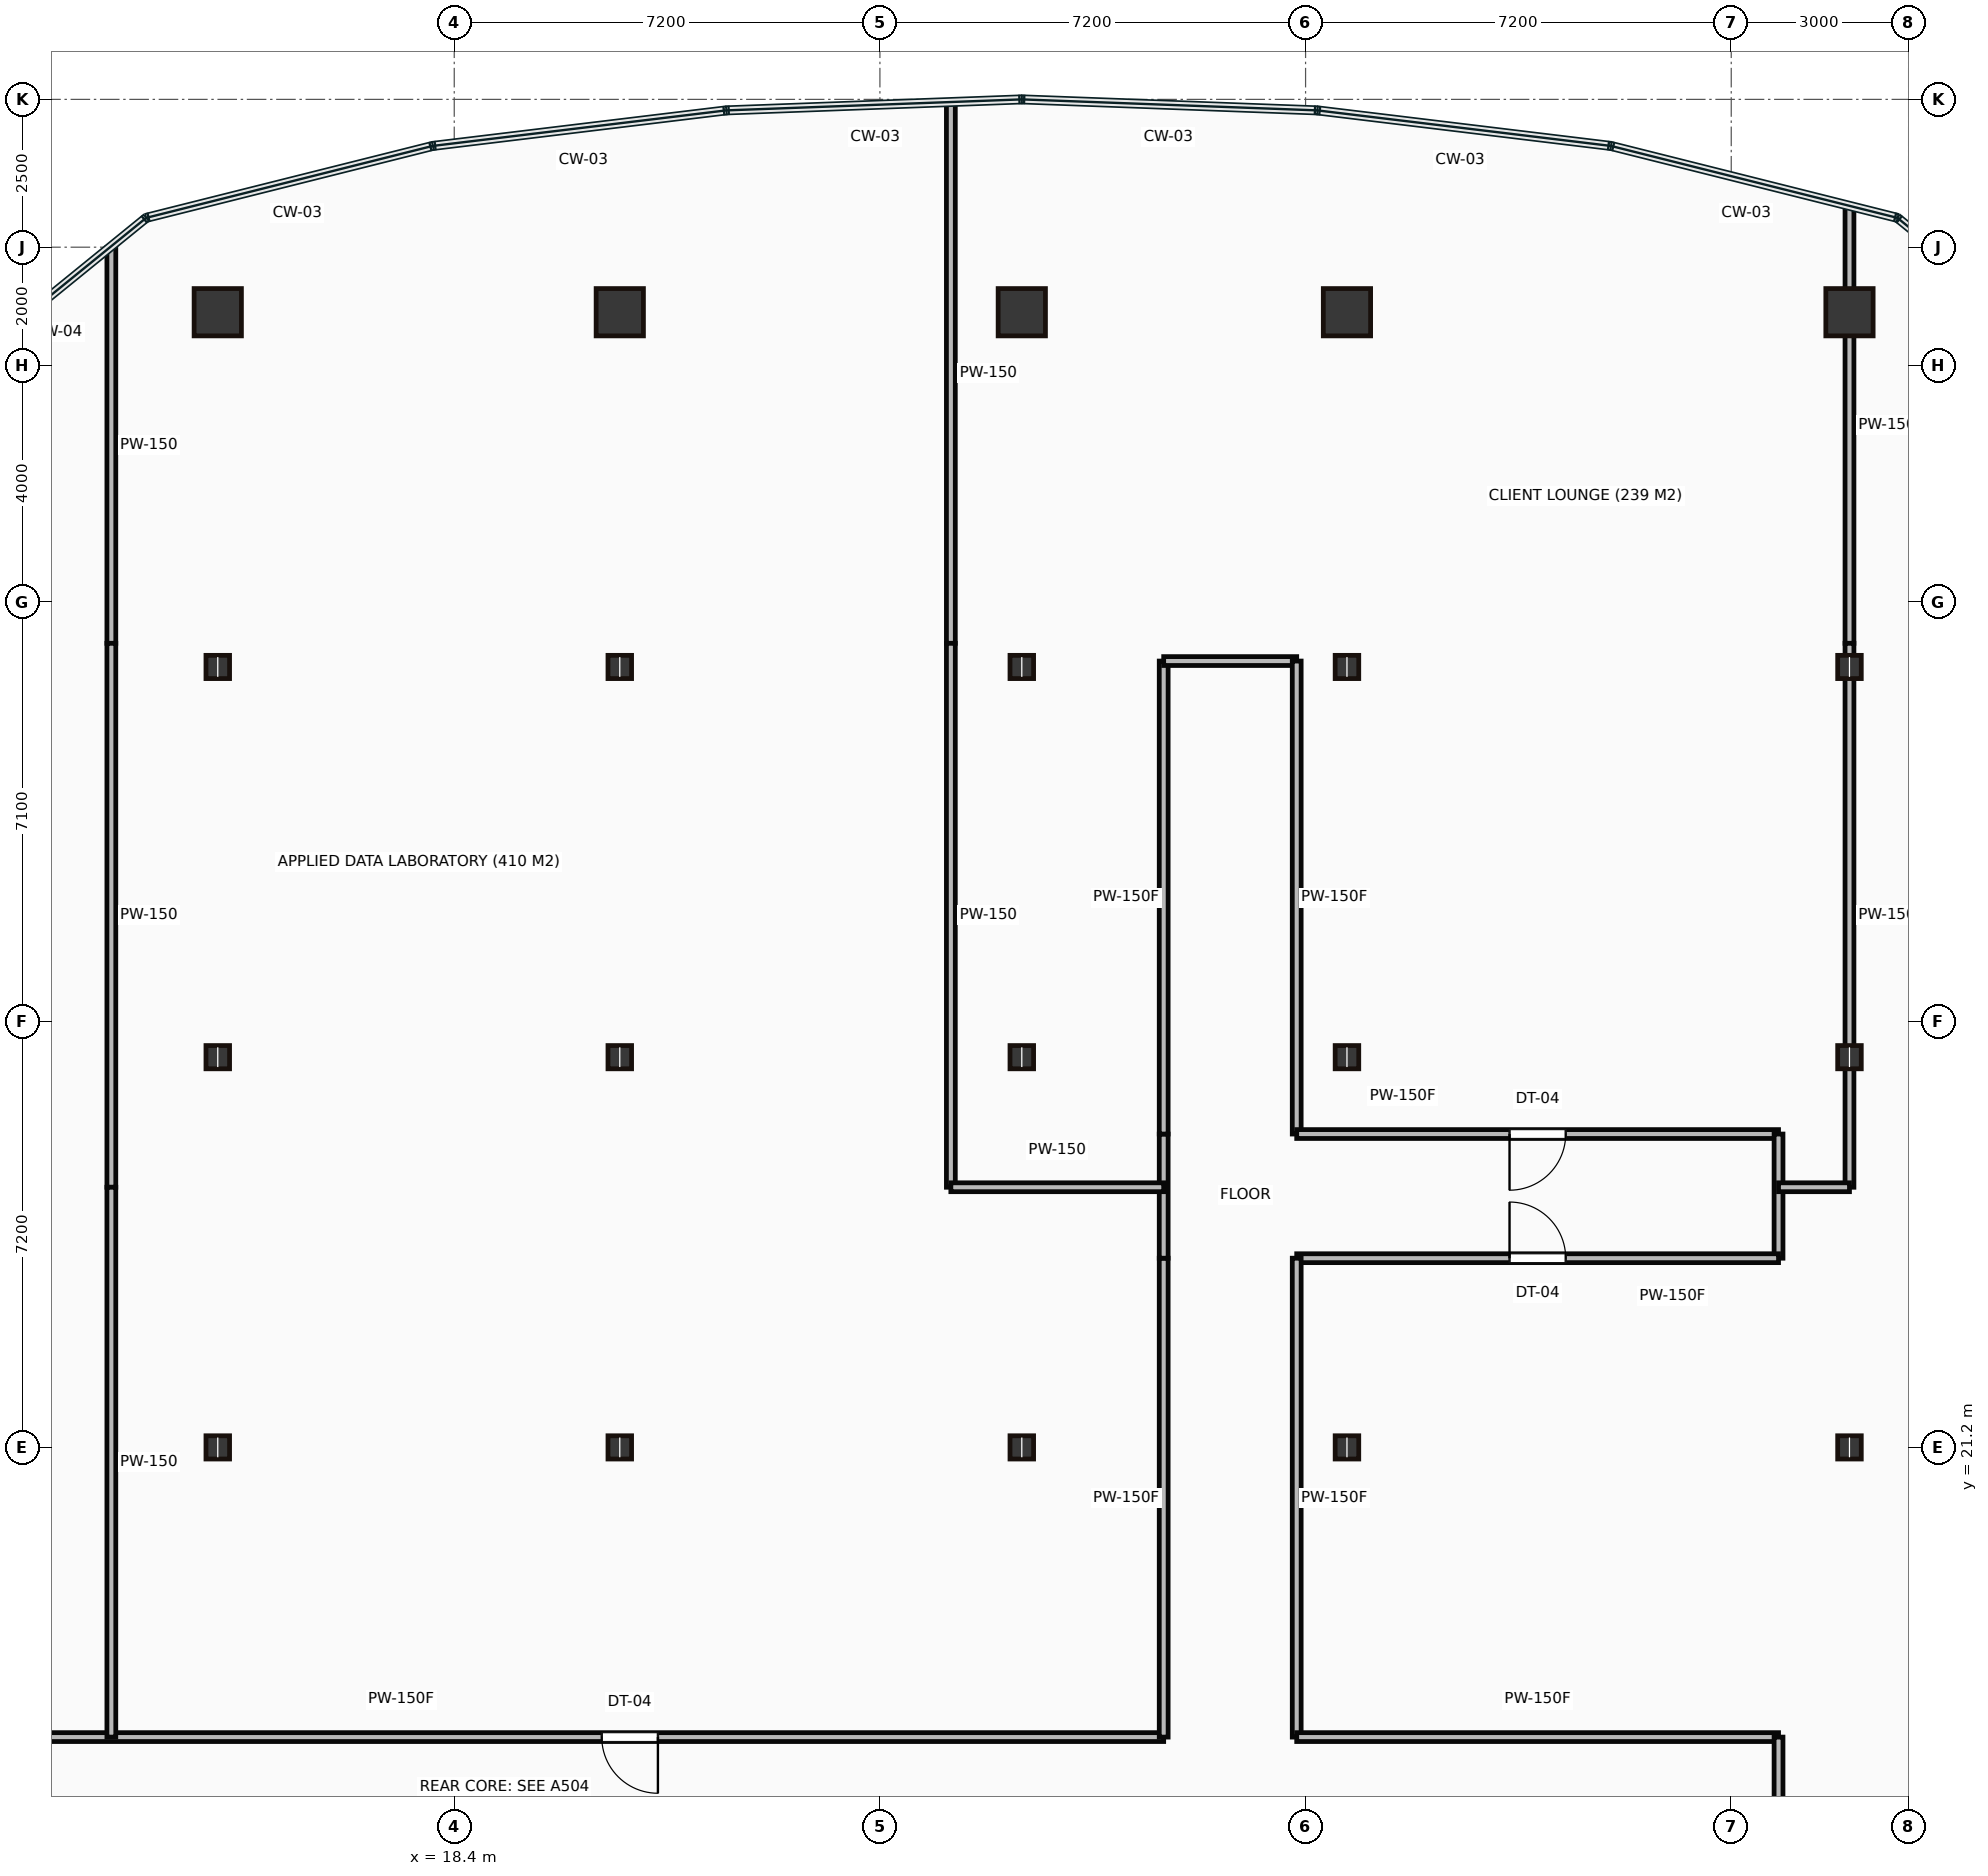
"""IFC4 building model, lengths in metres.
Left out: names, types, materials, properties, quantities, classifications, styles, units other than length and angle.
Written with IfcOpenShell. Run it as: python <this file> out.ifc"""

import sys

from ifc_helpers import new_model, si_unit, direction, frame, frame_2d, origin, origin_2d, place, context, subcontext, project, spatial, rectangle, hollow_rectangle, i_section, extrude, source, transform, mapped, element, fill, save


model = new_model("IFC4")
c1 = context("Model", 3, precision=1e-05, world=origin(), true_north=direction((0.0, 1.0)))
c2 = subcontext(c1, "Body", "Model", "MODEL_VIEW")
j1 = project(units=[si_unit("LENGTHUNIT", "METRE"), si_unit("PLANEANGLEUNIT", "RADIAN")], contexts=[c1])
p1 = place(None, origin())
s1 = spatial("IfcSite", under=j1, at=p1, CompositionType="ELEMENT")
p2 = place(p1, origin())
s2 = spatial("IfcBuilding", under=s1, at=p2, CompositionType="ELEMENT")
p3 = place(p2, frame((0.0, 0.0, 99.6)))
s3 = spatial("IfcBuildingStorey", under=s2, at=p3, CompositionType="ELEMENT", Elevation=99.6)
m1 = source(origin(), c2, "Body", "SweptSolid", [
    extrude(i_section(OverallWidth=0.399, OverallDepth=0.393, WebThickness=0.023, FlangeThickness=0.037, at=origin_2d()), origin(), (0.0, 0.0, 1.0), 3.65),
])
for number, where, z_axis, x_axis in (
    (1, (14.4, 21.2, 0.0), (0.0, 0.0, 1.0), (1.0, 0.0, 0.0)),
    (2, (14.4, 27.8, 0.0), (0.0, 0.0, 1.0), (1.0, 0.0, 0.0)),
    (3, (14.4, 34.4, 0.0), (0.0, 0.0, 1.0), (1.0, 0.0, 0.0)),
):
    element("IfcColumn", number, at=place(p3, frame(where, z_axis=z_axis, x_axis=x_axis)), inside=s3, PredefinedType="COLUMN", context=c2, shape_type="MappedRepresentation", body=[
        mapped(m1, transform((0.0, 0.0, 0.0))),
    ])
m2 = source(origin(), c2, "Body", "SweptSolid", [
    extrude(hollow_rectangle(XDim=0.8, YDim=0.8, WallThickness=0.04, at=origin_2d()), origin(), (0.0, 0.0, 1.0), 3.65),
])
p4 = place(p3, frame((14.4, 40.4, 0.0), z_axis=(0.0, 0.0, 1.0), x_axis=(1.0, 0.0, 0.0)))
e4 = element("IfcColumn", 4, at=p4, inside=s3, PredefinedType="COLUMN", context=c2, shape_type="MappedRepresentation", body=[
    mapped(m2, transform((0.0, 0.0, 0.0))),
])
for number, where, z_axis, x_axis in (
    (5, (21.2, 21.2, 0.0), (0.0, 0.0, 1.0), (1.0, 0.0, 0.0)),
    (6, (21.2, 27.8, 0.0), (0.0, 0.0, 1.0), (1.0, 0.0, 0.0)),
    (7, (21.2, 34.4, 0.0), (0.0, 0.0, 1.0), (1.0, 0.0, 0.0)),
):
    element("IfcColumn", number, at=place(p3, frame(where, z_axis=z_axis, x_axis=x_axis)), inside=s3, PredefinedType="COLUMN", context=c2, shape_type="MappedRepresentation", body=[
        mapped(m1, transform((0.0, 0.0, 0.0))),
    ])
p5 = place(p3, frame((21.2, 40.4, 0.0), z_axis=(0.0, 0.0, 1.0), x_axis=(1.0, 0.0, 0.0)))
e8 = element("IfcColumn", 8, at=p5, inside=s3, PredefinedType="COLUMN", context=c2, shape_type="MappedRepresentation", body=[
    mapped(m2, transform((0.0, 0.0, 0.0))),
])
for number, where, z_axis, x_axis in (
    (9, (28.0, 21.2, 0.0), (0.0, 0.0, 1.0), (1.0, 0.0, 0.0)),
    (10, (28.0, 27.8, 0.0), (0.0, 0.0, 1.0), (1.0, 0.0, 0.0)),
    (11, (28.0, 34.4, 0.0), (0.0, 0.0, 1.0), (1.0, 0.0, 0.0)),
):
    element("IfcColumn", number, at=place(p3, frame(where, z_axis=z_axis, x_axis=x_axis)), inside=s3, PredefinedType="COLUMN", context=c2, shape_type="MappedRepresentation", body=[
        mapped(m1, transform((0.0, 0.0, 0.0))),
    ])
p6 = place(p3, frame((28.0, 40.4, 0.0), z_axis=(0.0, 0.0, 1.0), x_axis=(1.0, 0.0, 0.0)))
e12 = element("IfcColumn", 12, at=p6, inside=s3, PredefinedType="COLUMN", context=c2, shape_type="MappedRepresentation", body=[
    mapped(m2, transform((0.0, 0.0, 0.0))),
])
for number, where, z_axis, x_axis in (
    (13, (33.5, 21.2, 0.0), (0.0, 0.0, 1.0), (1.0, 0.0, 0.0)),
    (14, (33.5, 27.8, 0.0), (0.0, 0.0, 1.0), (1.0, 0.0, 0.0)),
    (15, (33.5, 34.4, 0.0), (0.0, 0.0, 1.0), (1.0, 0.0, 0.0)),
):
    element("IfcColumn", number, at=place(p3, frame(where, z_axis=z_axis, x_axis=x_axis)), inside=s3, PredefinedType="COLUMN", context=c2, shape_type="MappedRepresentation", body=[
        mapped(m1, transform((0.0, 0.0, 0.0))),
    ])
p7 = place(p3, frame((33.5, 40.4, 0.0), z_axis=(0.0, 0.0, 1.0), x_axis=(1.0, 0.0, 0.0)))
e16 = element("IfcColumn", 16, at=p7, inside=s3, PredefinedType="COLUMN", context=c2, shape_type="MappedRepresentation", body=[
    mapped(m2, transform((0.0, 0.0, 0.0))),
])
for number, where, z_axis, x_axis in (
    (17, (42.0, 21.2, 0.0), (0.0, 0.0, 1.0), (1.0, 0.0, 0.0)),
    (18, (42.0, 27.8, 0.0), (0.0, 0.0, 1.0), (1.0, 0.0, 0.0)),
    (19, (42.0, 34.4, 0.0), (0.0, 0.0, 1.0), (1.0, 0.0, 0.0)),
):
    element("IfcColumn", number, at=place(p3, frame(where, z_axis=z_axis, x_axis=x_axis)), inside=s3, PredefinedType="COLUMN", context=c2, shape_type="MappedRepresentation", body=[
        mapped(m1, transform((0.0, 0.0, 0.0))),
    ])
p8 = place(p3, frame((42.0, 40.4, 0.0), z_axis=(0.0, 0.0, 1.0), x_axis=(1.0, 0.0, 0.0)))
e20 = element("IfcColumn", 20, at=p8, inside=s3, PredefinedType="COLUMN", context=c2, shape_type="MappedRepresentation", body=[
    mapped(m2, transform((0.0, 0.0, 0.0))),
])
m3 = source(origin(), c2, "Body", "SweptSolid", [
    extrude(rectangle(XDim=25.8, YDim=0.15, at=frame_2d((12.9, 0.0))), origin(), (0.0, 0.0, 1.0), 3.4),
])
p9 = place(p3, frame((4.6, 16.3, 0.0), z_axis=(0.0, 0.0, 1.0), x_axis=(1.0, 0.0, 0.0)))
e21 = element("IfcWall", 21, at=p9, inside=s3, PredefinedType="PARTITIONING", context=c2, shape_type="MappedRepresentation", body=[
    mapped(m3, transform((0.0, 0.0, 0.0))),
])
p10 = place(p9, frame((3.655, 0.0, 0.0)))
e22 = element("IfcOpeningElement", 22, at=p10, cuts=e21, PredefinedType="OPENING", context=c2, shape_type="SweptSolid", body=[
    extrude(rectangle(XDim=0.95, YDim=2.15, at=frame_2d((0.475, 1.075))), frame((0.0, 0.085, 0.0), z_axis=(0.0, -1.0, 0.0), x_axis=(1.0, 0.0, 0.0)), (0.0, 0.0, 1.0), 0.17),
])
p11 = place(p9, frame((16.295, 0.0, 0.0)))
e23 = element("IfcOpeningElement", 23, at=p11, cuts=e21, PredefinedType="OPENING", context=c2, shape_type="SweptSolid", body=[
    extrude(rectangle(XDim=0.95, YDim=2.15, at=frame_2d((0.475, 1.075))), frame((0.0, 0.085, 0.0), z_axis=(0.0, -1.0, 0.0), x_axis=(1.0, 0.0, 0.0)), (0.0, 0.0, 1.0), 0.17),
])
m4 = source(origin(), c2, "Body", "SweptSolid", [
    extrude(rectangle(XDim=8.1, YDim=0.15, at=frame_2d((4.05, 0.0))), origin(), (0.0, 0.0, 1.0), 3.4),
])
p12 = place(p3, frame((30.4, 16.3, 0.0), z_axis=(0.0, 0.0, 1.0), x_axis=(0.0, 1.0, 0.0)))
e24 = element("IfcWall", 24, at=p12, inside=s3, PredefinedType="PARTITIONING", context=c2, shape_type="MappedRepresentation", body=[
    mapped(m4, transform((0.0, 0.0, 0.0))),
])
m5 = source(origin(), c2, "Body", "SweptSolid", [
    extrude(rectangle(XDim=2.1, YDim=0.15, at=frame_2d((1.05, 0.0))), origin(), (0.0, 0.0, 1.0), 3.4),
])
p13 = place(p3, frame((30.4, 24.4, 0.0), z_axis=(0.0, 0.0, 1.0), x_axis=(0.0, 1.0, 0.0)))
e25 = element("IfcWall", 25, at=p13, inside=s3, PredefinedType="PARTITIONING", context=c2, shape_type="MappedRepresentation", body=[
    mapped(m5, transform((0.0, 0.0, 0.0))),
])
m6 = source(origin(), c2, "Body", "SweptSolid", [
    extrude(rectangle(XDim=8.0, YDim=0.15, at=frame_2d((4.0, 0.0))), origin(), (0.0, 0.0, 1.0), 3.4),
])
p14 = place(p3, frame((30.4, 26.5, 0.0), z_axis=(0.0, 0.0, 1.0), x_axis=(0.0, 1.0, 0.0)))
e26 = element("IfcWall", 26, at=p14, inside=s3, PredefinedType="PARTITIONING", context=c2, shape_type="MappedRepresentation", body=[
    mapped(m6, transform((0.0, 0.0, 0.0))),
])
m7 = source(origin(), c2, "Body", "SweptSolid", [
    extrude(rectangle(XDim=2.25, YDim=0.15, at=frame_2d((1.125, 0.0))), origin(), (0.0, 0.0, 1.0), 2.702),
])
p15 = place(p3, frame((30.4, 34.5, 0.0), z_axis=(0.0, 0.0, 1.0), x_axis=(1.0, 0.0, 0.0)))
e27 = element("IfcWall", 27, at=p15, inside=s3, PredefinedType="PARTITIONING", context=c2, shape_type="MappedRepresentation", body=[
    mapped(m7, transform((0.0, 0.0, 0.0))),
])
p16 = place(p3, frame((32.65, 34.5, 0.0), z_axis=(0.0, 0.0, 1.0), x_axis=(0.0, -1.0, 0.0)))
e28 = element("IfcWall", 28, at=p16, inside=s3, PredefinedType="PARTITIONING", context=c2, shape_type="MappedRepresentation", body=[
    mapped(m6, transform((0.0, 0.0, 0.0))),
])
m8 = source(origin(), c2, "Body", "SweptSolid", [
    extrude(rectangle(XDim=8.15, YDim=0.15, at=frame_2d((4.075, 0.0))), origin(), (0.0, 0.0, 1.0), 3.4),
])
p17 = place(p3, frame((32.65, 26.5, 0.0), z_axis=(0.0, 0.0, 1.0), x_axis=(1.0, 0.0, 0.0)))
e29 = element("IfcWall", 29, at=p17, inside=s3, PredefinedType="PARTITIONING", context=c2, shape_type="MappedRepresentation", body=[
    mapped(m8, transform((0.0, 0.0, 0.0))),
])
p18 = place(p17, frame((3.6, 0.0, 0.0)))
e30 = element("IfcOpeningElement", 30, at=p18, cuts=e29, PredefinedType="OPENING", context=c2, shape_type="SweptSolid", body=[
    extrude(rectangle(XDim=0.95, YDim=2.15, at=frame_2d((0.475, 1.075))), frame((0.0, 0.085, 0.0), z_axis=(0.0, -1.0, 0.0), x_axis=(1.0, 0.0, 0.0)), (0.0, 0.0, 1.0), 0.17),
])
p19 = place(p3, frame((40.8, 26.5, 0.0), z_axis=(0.0, 0.0, 1.0), x_axis=(0.0, -1.0, 0.0)))
e31 = element("IfcWall", 31, at=p19, inside=s3, PredefinedType="PARTITIONING", context=c2, shape_type="MappedRepresentation", body=[
    mapped(m5, transform((0.0, 0.0, 0.0))),
])
p20 = place(p3, frame((40.8, 24.4, 0.0), z_axis=(0.0, 0.0, 1.0), x_axis=(-1.0, 0.0, 0.0)))
e32 = element("IfcWall", 32, at=p20, inside=s3, PredefinedType="PARTITIONING", context=c2, shape_type="MappedRepresentation", body=[
    mapped(m8, transform((0.0, 0.0, 0.0))),
])
p21 = place(p20, frame((3.6, 0.0, 0.0)))
e33 = element("IfcOpeningElement", 33, at=p21, cuts=e32, PredefinedType="OPENING", context=c2, shape_type="SweptSolid", body=[
    extrude(rectangle(XDim=0.95, YDim=2.15, at=frame_2d((0.475, 1.075))), frame((0.0, 0.085, 0.0), z_axis=(0.0, -1.0, 0.0), x_axis=(1.0, 0.0, 0.0)), (0.0, 0.0, 1.0), 0.17),
])
p22 = place(p3, frame((32.65, 24.4, 0.0), z_axis=(0.0, 0.0, 1.0), x_axis=(0.0, -1.0, 0.0)))
e34 = element("IfcWall", 34, at=p22, inside=s3, PredefinedType="PARTITIONING", context=c2, shape_type="MappedRepresentation", body=[
    mapped(m4, transform((0.0, 0.0, 0.0))),
])
p23 = place(p3, frame((32.65, 16.3, 0.0), z_axis=(0.0, 0.0, 1.0), x_axis=(1.0, 0.0, 0.0)))
e35 = element("IfcWall", 35, at=p23, inside=s3, PredefinedType="PARTITIONING", context=c2, shape_type="MappedRepresentation", body=[
    mapped(m8, transform((0.0, 0.0, 0.0))),
])
m9 = source(origin(), c2, "Body", "SweptSolid", [
    extrude(rectangle(XDim=2.3, YDim=0.15, at=frame_2d((1.15, 0.0))), origin(), (0.0, 0.0, 1.0), 3.4),
])
p24 = place(p3, frame((40.8, 16.3, 0.0), z_axis=(0.0, 0.0, 1.0), x_axis=(0.0, -1.0, 0.0)))
e36 = element("IfcWall", 36, at=p24, inside=s3, PredefinedType="PARTITIONING", context=c2, shape_type="MappedRepresentation", body=[
    mapped(m9, transform((0.0, 0.0, 0.0))),
])
m10 = source(origin(), c2, "Body", "SweptSolid", [
    extrude(rectangle(XDim=6.692, YDim=0.15, at=frame_2d((3.346, 0.0))), origin(), (0.0, 0.0, 1.0), 3.4),
])
p25 = place(p3, frame((12.6, 41.492, 0.0), z_axis=(0.0, 0.0, 1.0), x_axis=(0.0, -1.0, 0.0)))
e37 = element("IfcWall", 37, at=p25, inside=s3, PredefinedType="PARTITIONING", context=c2, shape_type="MappedRepresentation", body=[
    mapped(m10, transform((0.0, 0.0, 0.0))),
])
m11 = source(origin(), c2, "Body", "SweptSolid", [
    extrude(rectangle(XDim=9.2, YDim=0.15, at=frame_2d((4.6, 0.0))), origin(), (0.0, 0.0, 1.0), 3.4),
])
p26 = place(p3, frame((12.6, 34.8, 0.0), z_axis=(0.0, 0.0, 1.0), x_axis=(0.0, -1.0, 0.0)))
e38 = element("IfcWall", 38, at=p26, inside=s3, PredefinedType="PARTITIONING", context=c2, shape_type="MappedRepresentation", body=[
    mapped(m11, transform((0.0, 0.0, 0.0))),
])
m12 = source(origin(), c2, "Body", "SweptSolid", [
    extrude(rectangle(XDim=9.3, YDim=0.15, at=frame_2d((4.65, 0.0))), origin(), (0.0, 0.0, 1.0), 3.4),
])
p27 = place(p3, frame((12.6, 25.6, 0.0), z_axis=(0.0, 0.0, 1.0), x_axis=(0.0, -1.0, 0.0)))
e39 = element("IfcWall", 39, at=p27, inside=s3, PredefinedType="PARTITIONING", context=c2, shape_type="MappedRepresentation", body=[
    mapped(m12, transform((0.0, 0.0, 0.0))),
])
m13 = source(origin(), c2, "Body", "SweptSolid", [
    extrude(rectangle(XDim=9.135, YDim=0.15, at=frame_2d((4.568, 0.0))), origin(), (0.0, 0.0, 1.0), 3.4),
])
p28 = place(p3, frame((26.8, 43.935, 0.0), z_axis=(0.0, 0.0, 1.0), x_axis=(0.0, -1.0, 0.0)))
e40 = element("IfcWall", 40, at=p28, inside=s3, PredefinedType="PARTITIONING", context=c2, shape_type="MappedRepresentation", body=[
    mapped(m13, transform((0.0, 0.0, 0.0))),
])
p29 = place(p3, frame((26.8, 34.8, 0.0), z_axis=(0.0, 0.0, 1.0), x_axis=(0.0, -1.0, 0.0)))
e41 = element("IfcWall", 41, at=p29, inside=s3, PredefinedType="PARTITIONING", context=c2, shape_type="MappedRepresentation", body=[
    mapped(m11, transform((0.0, 0.0, 0.0))),
])
m14 = source(origin(), c2, "Body", "SweptSolid", [
    extrude(rectangle(XDim=3.6, YDim=0.15, at=frame_2d((1.8, 0.0))), origin(), (0.0, 0.0, 1.0), 2.988),
])
p30 = place(p3, frame((26.8, 25.6, 0.0), z_axis=(0.0, 0.0, 1.0), x_axis=(1.0, 0.0, 0.0)))
e42 = element("IfcWall", 42, at=p30, inside=s3, PredefinedType="PARTITIONING", context=c2, shape_type="MappedRepresentation", body=[
    mapped(m14, transform((0.0, 0.0, 0.0))),
])
m15 = source(origin(), c2, "Body", "SweptSolid", [
    extrude(rectangle(XDim=7.379, YDim=0.15, at=frame_2d((3.689, 0.0))), origin(), (0.0, 0.0, 1.0), 2.702),
])
p31 = place(p3, frame((42.0, 42.179, 0.0), z_axis=(0.0, 0.0, 1.0), x_axis=(0.0, -1.0, 0.0)))
e43 = element("IfcWall", 43, at=p31, inside=s3, PredefinedType="PARTITIONING", context=c2, shape_type="MappedRepresentation", body=[
    mapped(m15, transform((0.0, 0.0, 0.0))),
])
m16 = source(origin(), c2, "Body", "SweptSolid", [
    extrude(rectangle(XDim=9.2, YDim=0.15, at=frame_2d((4.6, 0.0))), origin(), (0.0, 0.0, 1.0), 2.702),
])
p32 = place(p3, frame((42.0, 34.8, 0.0), z_axis=(0.0, 0.0, 1.0), x_axis=(0.0, -1.0, 0.0)))
e44 = element("IfcWall", 44, at=p32, inside=s3, PredefinedType="PARTITIONING", context=c2, shape_type="MappedRepresentation", body=[
    mapped(m16, transform((0.0, 0.0, 0.0))),
])
m17 = source(origin(), c2, "Body", "SweptSolid", [
    extrude(rectangle(XDim=1.2, YDim=0.15, at=frame_2d((0.6, 0.0))), origin(), (0.0, 0.0, 1.0), 2.988),
])
p33 = place(p3, frame((42.0, 25.6, 0.0), z_axis=(0.0, 0.0, 1.0), x_axis=(-1.0, 0.0, 0.0)))
e45 = element("IfcWall", 45, at=p33, inside=s3, PredefinedType="PARTITIONING", context=c2, shape_type="MappedRepresentation", body=[
    mapped(m17, transform((0.0, 0.0, 0.0))),
])
m18 = source(origin(), c2, "Body", "SweptSolid", [
    extrude(rectangle(XDim=0.95, YDim=2.15, at=frame_2d((0.475, 1.075))), frame((0.0, 0.025, 0.0), z_axis=(0.0, -1.0, 0.0), x_axis=(1.0, 0.0, 0.0)), (0.0, 0.0, 1.0), 0.05),
])
p34 = place(p11, origin())
e46 = element("IfcDoor", 46, at=p34, inside=s3, OperationType="SINGLE_SWING_RIGHT", PredefinedType="DOOR", context=c2, shape_type="MappedRepresentation", body=[
    mapped(m18, transform((0.0, 0.0, 0.0))),
])
fill(e23, e46)
p35 = place(p18, origin())
e47 = element("IfcDoor", 47, at=p35, inside=s3, OperationType="SINGLE_SWING_LEFT", PredefinedType="DOOR", context=c2, shape_type="MappedRepresentation", body=[
    mapped(m18, transform((0.0, 0.0, 0.0))),
])
fill(e30, e47)
p36 = place(p21, origin())
e48 = element("IfcDoor", 48, at=p36, inside=s3, OperationType="SINGLE_SWING_RIGHT", PredefinedType="DOOR", context=c2, shape_type="MappedRepresentation", body=[
    mapped(m18, transform((0.0, 0.0, 0.0))),
])
fill(e33, e48)
save(model, sys.argv[1])
